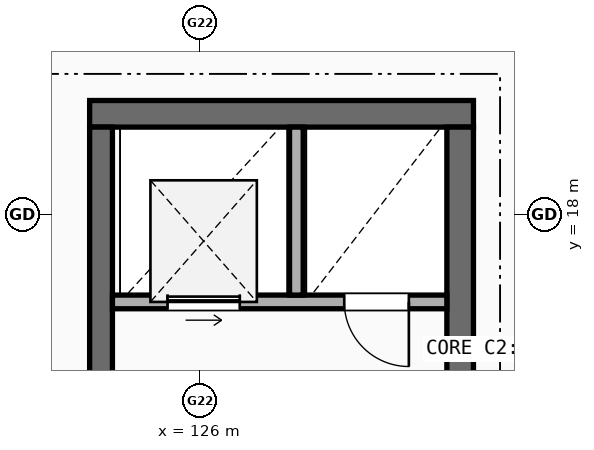
"""IFC4 building model, lengths in metres.
Left out: names, types, materials, properties, quantities, classifications, styles, units other than length and angle.
Written with IfcOpenShell. Run it as: python <this file> out.ifc"""

import sys

from ifc_helpers import new_model, si_unit, direction, frame, frame_2d, origin, place, context, subcontext, project, spatial, rectangle, extrude, element, fill, save


model = new_model("IFC4")
c1 = context("Model", 3, precision=1e-05, world=origin(), true_north=direction((0.0, 1.0)))
c2 = subcontext(c1, "Body", "Model", "MODEL_VIEW")
j1 = project(units=[si_unit("LENGTHUNIT", "METRE"), si_unit("PLANEANGLEUNIT", "RADIAN")], contexts=[c1])
p1 = place(None, origin())
s1 = spatial("IfcSite", under=j1, at=p1, CompositionType="ELEMENT")
p2 = place(p1, origin())
s2 = spatial("IfcBuilding", under=s1, at=p2, CompositionType="ELEMENT")
p3 = place(p2, frame((0.0, 0.0, 17.3)))
s3 = spatial("IfcBuildingStorey", under=s2, at=p3, CompositionType="ELEMENT", Elevation=17.3)
p4 = place(p3, frame((129.6, 19.325, 0.0), z_axis=(0.0, 0.0, 1.0), x_axis=(-1.0, 0.0, 0.0)))
e1 = element("IfcWall", 1, at=p4, inside=s3, PredefinedType="SHEAR", context=c2, shape_type="SweptSolid", body=[
    extrude(rectangle(XDim=5.05, YDim=0.35, at=frame_2d((2.525, 0.0))), origin(), (0.0, 0.0, 1.0), 2.965),
])
p5 = place(p3, frame((129.425, 12.75, 0.0), z_axis=(0.0, 0.0, 1.0), x_axis=(0.0, 1.0, 0.0)))
e2 = element("IfcWall", 2, at=p5, inside=s3, PredefinedType="SHEAR", context=c2, shape_type="SweptSolid", body=[
    extrude(rectangle(XDim=6.4, YDim=0.35, at=frame_2d((3.2, 0.0))), origin(), (0.0, 0.0, 1.0), 2.965),
])
p6 = place(p3, frame((124.7, 15.7, 0.0), z_axis=(0.0, 0.0, 1.0), x_axis=(0.0, 1.0, 0.0)))
e3 = element("IfcWall", 3, at=p6, inside=s3, PredefinedType="SHEAR", context=c2, shape_type="SweptSolid", body=[
    extrude(rectangle(XDim=3.45, YDim=0.3, at=frame_2d((1.725, 0.0))), origin(), (0.0, 0.0, 1.0), 2.965),
])
p7 = place(p3, frame((124.85, 16.85, 0.0), z_axis=(0.0, 0.0, 1.0), x_axis=(1.0, 0.0, 0.0)))
e4 = element("IfcWall", 4, at=p7, inside=s3, PredefinedType="SOLIDWALL", context=c2, shape_type="SweptSolid", body=[
    extrude(rectangle(XDim=4.4, YDim=0.18, at=frame_2d((2.2, 0.0))), origin(), (0.0, 0.0, 1.0), 2.965),
])
p8 = place(p7, frame((0.725, 0.0, 0.0)))
e5 = element("IfcOpeningElement", 5, at=p8, cuts=e4, PredefinedType="OPENING", context=c2, shape_type="SweptSolid", body=[
    extrude(rectangle(XDim=0.95, YDim=2.15, at=frame_2d((0.475, 1.075))), frame((0.0, 0.1, 0.0), z_axis=(0.0, -1.0, 0.0), x_axis=(1.0, 0.0, 0.0)), (0.0, 0.0, 1.0), 0.2),
])
p9 = place(p7, frame((3.05, 0.0, 0.0)))
e6 = element("IfcOpeningElement", 6, at=p9, cuts=e4, PredefinedType="OPENING", context=c2, shape_type="SweptSolid", body=[
    extrude(rectangle(XDim=0.85, YDim=2.1, at=frame_2d((0.425, 1.05))), frame((0.0, 0.1, 0.0), z_axis=(0.0, -1.0, 0.0), x_axis=(1.0, 0.0, 0.0)), (0.0, 0.0, 1.0), 0.2),
])
p10 = place(p3, frame((127.27, 16.94, 0.0), z_axis=(0.0, 0.0, 1.0), x_axis=(0.0, 1.0, 0.0)))
e7 = element("IfcWall", 7, at=p10, inside=s3, PredefinedType="SOLIDWALL", context=c2, shape_type="SweptSolid", body=[
    extrude(rectangle(XDim=2.21, YDim=0.18, at=frame_2d((1.105, 0.0))), origin(), (0.0, 0.0, 1.0), 2.965),
])
p11 = place(p8, origin())
e8 = element("IfcDoor", 8, at=p11, inside=s3, OperationType="SLIDING_TO_LEFT", PredefinedType="DOOR", context=c2, shape_type="SweptSolid", body=[
    extrude(rectangle(XDim=0.95, YDim=2.15, at=frame_2d((0.475, 1.075))), frame((0.0, 0.025, 0.0), z_axis=(0.0, -1.0, 0.0), x_axis=(1.0, 0.0, 0.0)), (0.0, 0.0, 1.0), 0.05),
])
fill(e5, e8)
p12 = place(p9, frame((0.85, 0.0, 0.0), z_axis=(0.0, 0.0, 1.0), x_axis=(-1.0, 0.0, 0.0)))
e9 = element("IfcDoor", 9, at=p12, inside=s3, OperationType="SINGLE_SWING_RIGHT", PredefinedType="DOOR", context=c2, shape_type="SweptSolid", body=[
    extrude(rectangle(XDim=0.85, YDim=2.1, at=frame_2d((0.425, 1.05))), frame((0.0, 0.025, 0.0), z_axis=(0.0, -1.0, 0.0), x_axis=(1.0, 0.0, 0.0)), (0.0, 0.0, 1.0), 0.05),
])
fill(e6, e9)
save(model, sys.argv[1])
